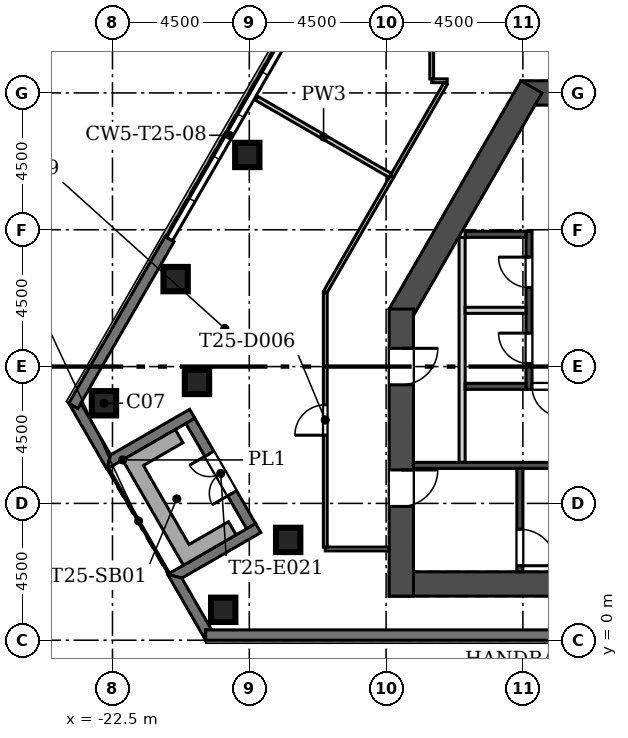
"""IFC4 building model, lengths in metres.
Left out: names, types, materials, properties, quantities, classifications, styles, units other than length and angle.
Written with IfcOpenShell. Run it as: python <this file> out.ifc"""

import sys

from ifc_helpers import new_model, si_unit, direction, frame, frame_2d, origin, origin_2d, place, context, subcontext, project, spatial, polyline, rectangle, outline, extrude, element, fill, save


model = new_model("IFC4")
c1 = context("Model", 3, precision=1e-05, world=origin(), true_north=direction((0.0, 1.0)))
c2 = subcontext(c1, "Body", "Model", "MODEL_VIEW")
j1 = project(units=[si_unit("LENGTHUNIT", "METRE"), si_unit("PLANEANGLEUNIT", "RADIAN")], contexts=[c1])
p1 = place(None, origin())
s1 = spatial("IfcSite", under=j1, at=p1, CompositionType="ELEMENT")
p2 = place(p1, origin())
s2 = spatial("IfcBuilding", under=s1, at=p2, CompositionType="ELEMENT")
p3 = place(p2, frame((0.0, 0.0, 339.3)))
s3 = spatial("IfcBuildingStorey", under=s2, at=p3, CompositionType="ELEMENT", Elevation=339.3)
for number, where, z_axis, x_axis in (
    (1, (-22.78, 7.794, 0.0), (0.0, 0.0, 1.0), (1.0, 0.0, 0.0)),
    (2, (-19.721, 8.495, 0.0), (0.0, 0.0, 1.0), (1.0, 0.0, 0.0)),
    (3, (-16.721, 3.299, 0.0), (0.0, 0.0, 1.0), (1.0, 0.0, 0.0)),
    (4, (-18.858, 1.0, 0.0), (0.0, 0.0, 1.0), (1.0, 0.0, 0.0)),
    (5, (-18.066, 15.96, 0.0), (0.0, 0.0, 1.0), (1.0, 0.0, 0.0)),
    (6, (-20.423, 11.877, 0.0), (0.0, 0.0, 1.0), (1.0, 0.0, 0.0)),
):
    element("IfcColumn", number, at=place(p3, frame(where, z_axis=z_axis, x_axis=x_axis)), inside=s3, PredefinedType="COLUMN", context=c2, shape_type="SweptSolid", body=[
        extrude(rectangle(XDim=0.8, YDim=0.8, at=origin_2d()), origin(), (0.0, 0.0, 1.0), 5.4),
    ])
p4 = place(p3, frame((-13.4, 1.85, 0.0), z_axis=(0.0, 0.0, 1.0), x_axis=(1.0, 0.0, 0.0)))
e7 = element("IfcWall", 7, at=p4, inside=s3, PredefinedType="SHEAR", context=c2, shape_type="SweptSolid", body=[
    extrude(rectangle(XDim=26.8, YDim=0.8, at=frame_2d((13.4, 0.0))), origin(), (0.0, 0.0, 1.0), 5.4),
])
p5 = place(p3, frame((9.065, 18.0, 0.0), z_axis=(0.0, 0.0, 1.0), x_axis=(-1.0, 0.0, 0.0)))
e8 = element("IfcWall", 8, at=p5, inside=s3, PredefinedType="SHEAR", context=c2, shape_type="SweptSolid", body=[
    extrude(rectangle(XDim=18.13, YDim=0.8, at=frame_2d((9.065, 0.0))), origin(), (0.0, 0.0, 1.0), 5.4),
])
p6 = place(p5, frame((8.365, 0.0, 0.0)))
e9 = element("IfcOpeningElement", 9, at=p6, cuts=e8, PredefinedType="OPENING", context=c2, shape_type="SweptSolid", body=[
    extrude(rectangle(XDim=1.4, YDim=2.1, at=frame_2d((0.7, 1.05))), frame((0.0, 0.41, 0.0), z_axis=(0.0, -1.0, 0.0), x_axis=(1.0, 0.0, 0.0)), (0.0, 0.0, 1.0), 0.82),
])
p7 = place(p5, frame((11.065, 0.0, 0.0)))
e10 = element("IfcOpeningElement", 10, at=p7, cuts=e8, PredefinedType="OPENING", context=c2, shape_type="SweptSolid", body=[
    extrude(rectangle(XDim=6.0, YDim=2.4, at=frame_2d((3.0, 1.2))), frame((0.0, 0.41, 0.0), z_axis=(0.0, -1.0, 0.0), x_axis=(1.0, 0.0, 0.0)), (0.0, 0.0, 1.0), 0.82),
])
p8 = place(p5, frame((1.065, 0.0, 0.0)))
e11 = element("IfcOpeningElement", 11, at=p8, cuts=e8, PredefinedType="OPENING", context=c2, shape_type="SweptSolid", body=[
    extrude(rectangle(XDim=6.0, YDim=2.4, at=frame_2d((3.0, 1.2))), frame((0.0, 0.41, 0.0), z_axis=(0.0, -1.0, 0.0), x_axis=(1.0, 0.0, 0.0)), (0.0, 0.0, 1.0), 0.82),
])
p9 = place(p3, frame((-8.719, 18.2, 0.0), z_axis=(0.0, 0.0, 1.0), x_axis=(-0.500015780397, -0.866016292776, 0.0)))
e12 = element("IfcWall", 12, at=p9, inside=s3, PredefinedType="SHEAR", context=c2, shape_type="SweptSolid", body=[
    extrude(rectangle(XDim=8.67, YDim=0.8, at=frame_2d((4.335, 0.0))), origin(), (0.0, 0.0, 1.0), 5.4),
])
p10 = place(p3, frame((-13.0, 10.892, 0.0), z_axis=(0.0, 0.0, 1.0), x_axis=(0.0, -1.0, 0.0)))
e13 = element("IfcWall", 13, at=p10, inside=s3, PredefinedType="SHEAR", context=c2, shape_type="SweptSolid", body=[
    extrude(rectangle(XDim=9.442, YDim=0.8, at=frame_2d((4.721, 0.0))), origin(), (0.0, 0.0, 1.0), 5.4),
])
p11 = place(p10, frame((5.292, 0.0, 0.0)))
e14 = element("IfcOpeningElement", 14, at=p11, cuts=e13, PredefinedType="OPENING", context=c2, shape_type="SweptSolid", body=[
    extrude(rectangle(XDim=1.2, YDim=2.1, at=frame_2d((0.6, 1.05))), frame((0.0, 0.41, 0.0), z_axis=(0.0, -1.0, 0.0), x_axis=(1.0, 0.0, 0.0)), (0.0, 0.0, 1.0), 0.82),
])
p12 = place(p10, frame((1.292, 0.0, 0.0)))
e15 = element("IfcOpeningElement", 15, at=p12, cuts=e13, PredefinedType="OPENING", context=c2, shape_type="SweptSolid", body=[
    extrude(rectangle(XDim=1.2, YDim=2.1, at=frame_2d((0.6, 1.05))), frame((0.0, 0.41, 0.0), z_axis=(0.0, -1.0, 0.0), x_axis=(1.0, 0.0, 0.0)), (0.0, 0.0, 1.0), 0.82),
])
p13 = place(p3, origin())
e16 = element("IfcWall", 16, at=p13, inside=s3, PredefinedType="SOLIDWALL", context=c2, shape_type="SweptSolid", body=[
    extrude(outline(polyline([(-22.685, 5.628), (-23.936, 7.795), (-23.936, 7.795), (-23.641, 7.625), (-23.542, 7.795), (-22.56, 6.094), (-22.685, 5.628), (-22.685, 5.628)])), origin(), (0.0, 0.0, 1.0), 4.6),
])
p14 = place(p3, origin())
e17 = element("IfcWall", 17, at=p14, inside=s3, PredefinedType="SOLIDWALL", context=c2, shape_type="SweptSolid", body=[
    extrude(outline(polyline([(-19.962, 7.594), (-19.792, 7.299), (-20.087, 7.129), (-22.686, 5.628), (-22.686, 5.628), (-22.561, 6.094), (-19.962, 7.594)])), origin(), (0.0, 0.0, 1.0), 4.6),
])
p15 = place(p3, frame((-19.94, 7.214, 0.0), z_axis=(0.0, 0.0, 1.0), x_axis=(0.49999894854, -0.866026010844, 0.0)))
e18 = element("IfcWall", 18, at=p15, inside=s3, PredefinedType="SOLIDWALL", context=c2, shape_type="SweptSolid", body=[
    extrude(rectangle(XDim=4.0, YDim=0.34, at=frame_2d((2.0, 0.0))), origin(), (0.0, 0.0, 1.0), 4.6),
])
p16 = place(p15, frame((1.25, 0.0, 0.0)))
e19 = element("IfcOpeningElement", 19, at=p16, cuts=e18, PredefinedType="OPENING", context=c2, shape_type="SweptSolid", body=[
    extrude(rectangle(XDim=1.5, YDim=2.4, at=frame_2d((0.75, 1.2))), frame((0.0, 0.18, 0.0), z_axis=(0.0, -1.0, 0.0), x_axis=(1.0, 0.0, 0.0)), (0.0, 0.0, 1.0), 0.36),
])
p17 = place(p3, origin())
e20 = element("IfcWall", 20, at=p17, inside=s3, PredefinedType="SOLIDWALL", context=c2, shape_type="SweptSolid", body=[
    extrude(outline(polyline([(-20.686, 2.165), (-18.087, 3.666), (-17.792, 3.836), (-17.622, 3.54), (-20.22, 2.04), (-20.686, 2.165), (-20.686, 2.165)])), origin(), (0.0, 0.0, 1.0), 4.6),
])
p18 = place(p3, origin())
e21 = element("IfcWall", 21, at=p18, inside=s3, PredefinedType="SOLIDWALL", context=c2, shape_type="SweptSolid", body=[
    extrude(outline(polyline([(-19.238, 0.339), (-19.434, 0.339), (-19.434, -0.001), (-19.435, -0.001), (-20.686, 2.166), (-20.686, 2.166), (-20.22, 2.041), (-19.238, 0.339)])), origin(), (0.0, 0.0, 1.0), 4.6),
])
p19 = place(p3, frame((-19.435, 0.17, 0.0), z_axis=(0.0, 0.0, 1.0), x_axis=(1.0, 0.0, 0.0)))
e22 = element("IfcWall", 22, at=p19, inside=s3, PredefinedType="SOLIDWALL", context=c2, shape_type="SweptSolid", body=[
    extrude(rectangle(XDim=34.935, YDim=0.34, at=frame_2d((17.468, 0.0))), origin(), (0.0, 0.0, 1.0), 4.6),
])
p20 = place(p3, frame((-20.622, 13.193, 0.0), z_axis=(0.0, 0.0, 1.0), x_axis=(-0.499999447814, -0.866025722589, 0.0)))
e23 = element("IfcWall", 23, at=p20, inside=s3, PredefinedType="SOLIDWALL", context=c2, shape_type="SweptSolid", body=[
    extrude(rectangle(XDim=6.333, YDim=0.34, at=frame_2d((3.166, 0.0))), origin(), (0.0, 0.0, 1.0), 4.6),
])
p21 = place(p3, origin())
e24 = element("IfcWall", 24, at=p21, inside=s3, PredefinedType="USERDEFINED", context=c2, shape_type="SweptSolid", body=[
    extrude(outline(polyline([(-18.683, 3.898), (-19.982, 3.148), (-21.482, 5.746), (-20.183, 6.496), (-20.433, 6.929), (-22.165, 5.929), (-20.165, 2.465), (-19.732, 2.715), (-19.732, 2.715), (-18.433, 3.465), (-18.683, 3.898)])), origin(), (0.0, 0.0, 1.0), 1.1),
])
p22 = place(p3, frame((-11.0, 5.85, 0.0), z_axis=(0.0, 0.0, 1.0), x_axis=(0.0, 1.0, 0.0)))
e25 = element("IfcWall", 25, at=p22, inside=s3, PredefinedType="SOLIDWALL", context=c2, shape_type="SweptSolid", body=[
    extrude(rectangle(XDim=7.4, YDim=0.2, at=frame_2d((3.7, 0.0))), origin(), (0.0, 0.0, 1.0), 4.6),
])
p23 = place(p3, frame((-8.8, 8.25, -0.4), z_axis=(0.0, 0.0, 1.0), x_axis=(0.0, 1.0, 0.0)))
e26 = element("IfcWall", 26, at=p23, inside=s3, PredefinedType="SOLIDWALL", context=c2, shape_type="SweptSolid", body=[
    extrude(rectangle(XDim=5.2, YDim=0.2, at=frame_2d((2.6, 0.0))), origin(), (0.0, 0.0, 1.0), 5.0),
])
p24 = place(p23, frame((0.85, 0.0, 0.4)))
e27 = element("IfcOpeningElement", 27, at=p24, cuts=e26, PredefinedType="OPENING", context=c2, shape_type="SweptSolid", body=[
    extrude(rectangle(XDim=1.0, YDim=2.1, at=frame_2d((0.5, 1.05))), frame((0.0, 0.11, 0.0), z_axis=(0.0, -1.0, 0.0), x_axis=(1.0, 0.0, 0.0)), (0.0, 0.0, 1.0), 0.22),
])
p25 = place(p23, frame((3.35, 0.0, 0.4)))
e28 = element("IfcOpeningElement", 28, at=p25, cuts=e26, PredefinedType="OPENING", context=c2, shape_type="SweptSolid", body=[
    extrude(rectangle(XDim=1.0, YDim=2.1, at=frame_2d((0.5, 1.05))), frame((0.0, 0.11, 0.0), z_axis=(0.0, -1.0, 0.0), x_axis=(1.0, 0.0, 0.0)), (0.0, 0.0, 1.0), 0.22),
])
p26 = place(p3, frame((-10.9, 8.35, -0.4), z_axis=(0.0, 0.0, 1.0), x_axis=(1.0, 0.0, 0.0)))
e29 = element("IfcWall", 29, at=p26, inside=s3, PredefinedType="SOLIDWALL", context=c2, shape_type="SweptSolid", body=[
    extrude(rectangle(XDim=2.0, YDim=0.2, at=frame_2d((1.0, 0.0))), origin(), (0.0, 0.0, 1.0), 5.0),
])
p27 = place(p3, frame((-12.6, 5.75, -0.4), z_axis=(0.0, 0.0, 1.0), x_axis=(1.0, 0.0, 0.0)))
e30 = element("IfcWall", 30, at=p27, inside=s3, PredefinedType="SOLIDWALL", context=c2, shape_type="SweptSolid", body=[
    extrude(rectangle(XDim=11.4, YDim=0.2, at=frame_2d((5.7, 0.0))), origin(), (0.0, 0.0, 1.0), 5.0),
])
p28 = place(p3, frame((-9.1, 2.25, -0.4), z_axis=(0.0, 0.0, 1.0), x_axis=(0.0, 1.0, 0.0)))
e31 = element("IfcWall", 31, at=p28, inside=s3, PredefinedType="SOLIDWALL", context=c2, shape_type="SweptSolid", body=[
    extrude(rectangle(XDim=3.4, YDim=0.2, at=frame_2d((1.7, 0.0))), origin(), (0.0, 0.0, 1.0), 5.0),
])
p29 = place(p28, frame((0.2, 0.0, 0.4)))
e32 = element("IfcOpeningElement", 32, at=p29, cuts=e31, PredefinedType="OPENING", context=c2, shape_type="SweptSolid", body=[
    extrude(rectangle(XDim=1.2, YDim=2.1, at=frame_2d((0.6, 1.05))), frame((0.0, 0.11, 0.0), z_axis=(0.0, -1.0, 0.0), x_axis=(1.0, 0.0, 0.0)), (0.0, 0.0, 1.0), 0.22),
])
p30 = place(p3, frame((-10.9, 10.85, 0.0), z_axis=(0.0, 0.0, 1.0), x_axis=(1.0, 0.0, 0.0)))
e33 = element("IfcWall", 33, at=p30, inside=s3, PredefinedType="SOLIDWALL", context=c2, shape_type="SweptSolid", body=[
    extrude(rectangle(XDim=2.0, YDim=0.2, at=frame_2d((1.0, 0.0))), origin(), (0.0, 0.0, 1.0), 4.6),
])
p31 = place(p3, frame((-10.9, 13.35, -0.4), z_axis=(0.0, 0.0, 1.0), x_axis=(1.0, 0.0, 0.0)))
e34 = element("IfcWall", 34, at=p31, inside=s3, PredefinedType="SOLIDWALL", context=c2, shape_type="SweptSolid", body=[
    extrude(rectangle(XDim=2.0, YDim=0.2, at=frame_2d((1.0, 0.0))), origin(), (0.0, 0.0, 1.0), 5.0),
])
p32 = place(p3, frame((-8.7, 8.35, 0.0), z_axis=(0.0, 0.0, 1.0), x_axis=(1.0, 0.0, 0.0)))
e35 = element("IfcWall", 35, at=p32, inside=s3, PredefinedType="SOLIDWALL", context=c2, shape_type="SweptSolid", body=[
    extrude(rectangle(XDim=2.8, YDim=0.2, at=frame_2d((1.4, 0.0))), origin(), (0.0, 0.0, 1.0), 4.6),
])
p33 = place(p32, origin())
e36 = element("IfcOpeningElement", 36, at=p33, cuts=e35, PredefinedType="OPENING", context=c2, shape_type="SweptSolid", body=[
    extrude(rectangle(XDim=1.0, YDim=2.1, at=frame_2d((0.5, 1.05))), frame((0.0, 0.11, 0.0), z_axis=(0.0, -1.0, 0.0), x_axis=(1.0, 0.0, 0.0)), (0.0, 0.0, 1.0), 0.22),
])
p34 = place(p3, frame((-11.49, 18.4, 0.0), z_axis=(0.0, 0.0, 1.0), x_axis=(-1.0, 0.0, 0.0)))
e37 = element("IfcWall", 37, at=p34, inside=s3, PredefinedType="PARTITIONING", context=c2, shape_type="SweptSolid", body=[
    extrude(rectangle(XDim=0.51, YDim=0.125, at=frame_2d((0.255, 0.0))), origin(), (0.0, 0.0, 1.0), 4.6),
])
p35 = place(p3, frame((-12.0, 18.462, 0.0), z_axis=(0.0, 0.0, 1.0), x_axis=(0.0, 1.0, 0.0)))
e38 = element("IfcWall", 38, at=p35, inside=s3, PredefinedType="PARTITIONING", context=c2, shape_type="SweptSolid", body=[
    extrude(rectangle(XDim=4.675, YDim=0.125, at=frame_2d((2.337, 0.0))), origin(), (0.0, 0.0, 1.0), 4.6),
])
p36 = place(p3, frame((-13.306, 15.254, 0.0), z_axis=(0.0, 0.0, 1.0), x_axis=(0.499984357326, 0.866034434898, 0.0)))
e39 = element("IfcWall", 39, at=p36, inside=s3, PredefinedType="PARTITIONING", context=c2, shape_type="SweptSolid", body=[
    extrude(rectangle(XDim=3.523, YDim=0.125, at=frame_2d((1.762, 0.0))), origin(), (0.0, 0.0, 1.0), 4.6),
])
p37 = place(p3, frame((-13.4, 3.0, 0.0), z_axis=(0.0, 0.0, 1.0), x_axis=(-1.0, 0.0, 0.0)))
e40 = element("IfcWall", 40, at=p37, inside=s3, PredefinedType="PARTITIONING", context=c2, shape_type="SweptSolid", body=[
    extrude(rectangle(XDim=2.1, YDim=0.125, at=frame_2d((1.05, 0.0))), origin(), (0.0, 0.0, 1.0), 4.6),
])
p38 = place(p3, frame((-15.5, 3.062, 0.0), z_axis=(0.0, 0.0, 1.0), x_axis=(0.0, 1.0, 0.0)))
e41 = element("IfcWall", 41, at=p38, inside=s3, PredefinedType="PARTITIONING", context=c2, shape_type="SweptSolid", body=[
    extrude(rectangle(XDim=8.361, YDim=0.125, at=frame_2d((4.181, 0.0))), origin(), (0.0, 0.0, 1.0), 4.6),
])
p39 = place(p38, frame((3.68, 0.0, 0.0)))
e42 = element("IfcOpeningElement", 42, at=p39, cuts=e41, PredefinedType="OPENING", context=c2, shape_type="SweptSolid", body=[
    extrude(rectangle(XDim=1.0, YDim=2.1, at=frame_2d((0.5, 1.05))), frame((0.0, 0.073, 0.0), z_axis=(0.0, -1.0, 0.0), x_axis=(1.0, 0.0, 0.0)), (0.0, 0.0, 1.0), 0.145),
])
p40 = place(p3, frame((-15.5, 11.455, 0.0), z_axis=(0.0, 0.0, 1.0), x_axis=(0.500005024956, 0.866022502605, 0.0)))
e43 = element("IfcWall", 43, at=p40, inside=s3, PredefinedType="PARTITIONING", context=c2, shape_type="SweptSolid", body=[
    extrude(rectangle(XDim=4.388, YDim=0.125, at=frame_2d((2.194, 0.0))), origin(), (0.0, 0.0, 1.0), 4.6),
])
p41 = place(p3, frame((-13.36, 15.285, 0.0), z_axis=(0.0, 0.0, 1.0), x_axis=(-0.86601005171, 0.50002658963, 0.0)))
e44 = element("IfcWall", 44, at=p41, inside=s3, PredefinedType="PARTITIONING", context=c2, shape_type="SweptSolid", body=[
    extrude(rectangle(XDim=5.073, YDim=0.15, at=frame_2d((2.536, 0.0))), origin(), (0.0, 0.0, 1.0), 4.6),
])
p42 = place(p16, frame((1.5, 0.0, 0.0), z_axis=(0.0, 0.0, 1.0), x_axis=(-1.0, 0.0, 0.0)))
e45 = element("IfcDoor", 45, at=p42, inside=s3, OperationType="DOUBLE_DOOR_SINGLE_SWING", PredefinedType="DOOR", context=c2, shape_type="SweptSolid", body=[
    extrude(rectangle(XDim=1.5, YDim=2.4, at=frame_2d((0.75, 1.2))), frame((0.0, 0.025, 0.0), z_axis=(0.0, -1.0, 0.0), x_axis=(1.0, 0.0, 0.0)), (0.0, 0.0, 1.0), 0.05),
])
fill(e19, e45)
p43 = place(p24, origin())
e46 = element("IfcDoor", 46, at=p43, inside=s3, OperationType="SINGLE_SWING_RIGHT", PredefinedType="DOOR", context=c2, shape_type="SweptSolid", body=[
    extrude(rectangle(XDim=1.0, YDim=2.1, at=frame_2d((0.5, 1.05))), frame((0.0, 0.025, 0.0), z_axis=(0.0, -1.0, 0.0), x_axis=(1.0, 0.0, 0.0)), (0.0, 0.0, 1.0), 0.05),
])
fill(e27, e46)
p44 = place(p25, origin())
e47 = element("IfcDoor", 47, at=p44, inside=s3, OperationType="SINGLE_SWING_RIGHT", PredefinedType="DOOR", context=c2, shape_type="SweptSolid", body=[
    extrude(rectangle(XDim=1.0, YDim=2.1, at=frame_2d((0.5, 1.05))), frame((0.0, 0.025, 0.0), z_axis=(0.0, -1.0, 0.0), x_axis=(1.0, 0.0, 0.0)), (0.0, 0.0, 1.0), 0.05),
])
fill(e28, e47)
p45 = place(p33, frame((1.0, 0.0, 0.0), z_axis=(0.0, 0.0, 1.0), x_axis=(-1.0, 0.0, 0.0)))
e48 = element("IfcDoor", 48, at=p45, inside=s3, OperationType="SINGLE_SWING_LEFT", PredefinedType="DOOR", context=c2, shape_type="SweptSolid", body=[
    extrude(rectangle(XDim=1.0, YDim=2.1, at=frame_2d((0.5, 1.05))), frame((0.0, 0.025, 0.0), z_axis=(0.0, -1.0, 0.0), x_axis=(1.0, 0.0, 0.0)), (0.0, 0.0, 1.0), 0.05),
])
fill(e36, e48)
p46 = place(p11, origin())
e49 = element("IfcDoor", 49, at=p46, inside=s3, OperationType="SINGLE_SWING_LEFT", PredefinedType="DOOR", context=c2, shape_type="SweptSolid", body=[
    extrude(rectangle(XDim=1.2, YDim=2.1, at=frame_2d((0.6, 1.05))), frame((0.0, 0.025, 0.0), z_axis=(0.0, -1.0, 0.0), x_axis=(1.0, 0.0, 0.0)), (0.0, 0.0, 1.0), 0.05),
])
fill(e14, e49)
p47 = place(p29, frame((1.2, 0.0, 0.0), z_axis=(0.0, 0.0, 1.0), x_axis=(-1.0, 0.0, 0.0)))
e50 = element("IfcDoor", 50, at=p47, inside=s3, OperationType="SINGLE_SWING_RIGHT", PredefinedType="DOOR", context=c2, shape_type="SweptSolid", body=[
    extrude(rectangle(XDim=1.2, YDim=2.1, at=frame_2d((0.6, 1.05))), frame((0.0, 0.025, 0.0), z_axis=(0.0, -1.0, 0.0), x_axis=(1.0, 0.0, 0.0)), (0.0, 0.0, 1.0), 0.05),
])
fill(e32, e50)
p48 = place(p12, origin())
e51 = element("IfcDoor", 51, at=p48, inside=s3, OperationType="SINGLE_SWING_LEFT", PredefinedType="DOOR", context=c2, shape_type="SweptSolid", body=[
    extrude(rectangle(XDim=1.2, YDim=2.1, at=frame_2d((0.6, 1.05))), frame((0.0, 0.025, 0.0), z_axis=(0.0, -1.0, 0.0), x_axis=(1.0, 0.0, 0.0)), (0.0, 0.0, 1.0), 0.05),
])
fill(e15, e51)
p49 = place(p39, origin())
e52 = element("IfcDoor", 52, at=p49, inside=s3, OperationType="SINGLE_SWING_LEFT", PredefinedType="DOOR", context=c2, shape_type="SweptSolid", body=[
    extrude(rectangle(XDim=1.0, YDim=2.1, at=frame_2d((0.5, 1.05))), frame((0.0, 0.025, 0.0), z_axis=(0.0, -1.0, 0.0), x_axis=(1.0, 0.0, 0.0)), (0.0, 0.0, 1.0), 0.05),
])
fill(e42, e52)
save(model, sys.argv[1])
